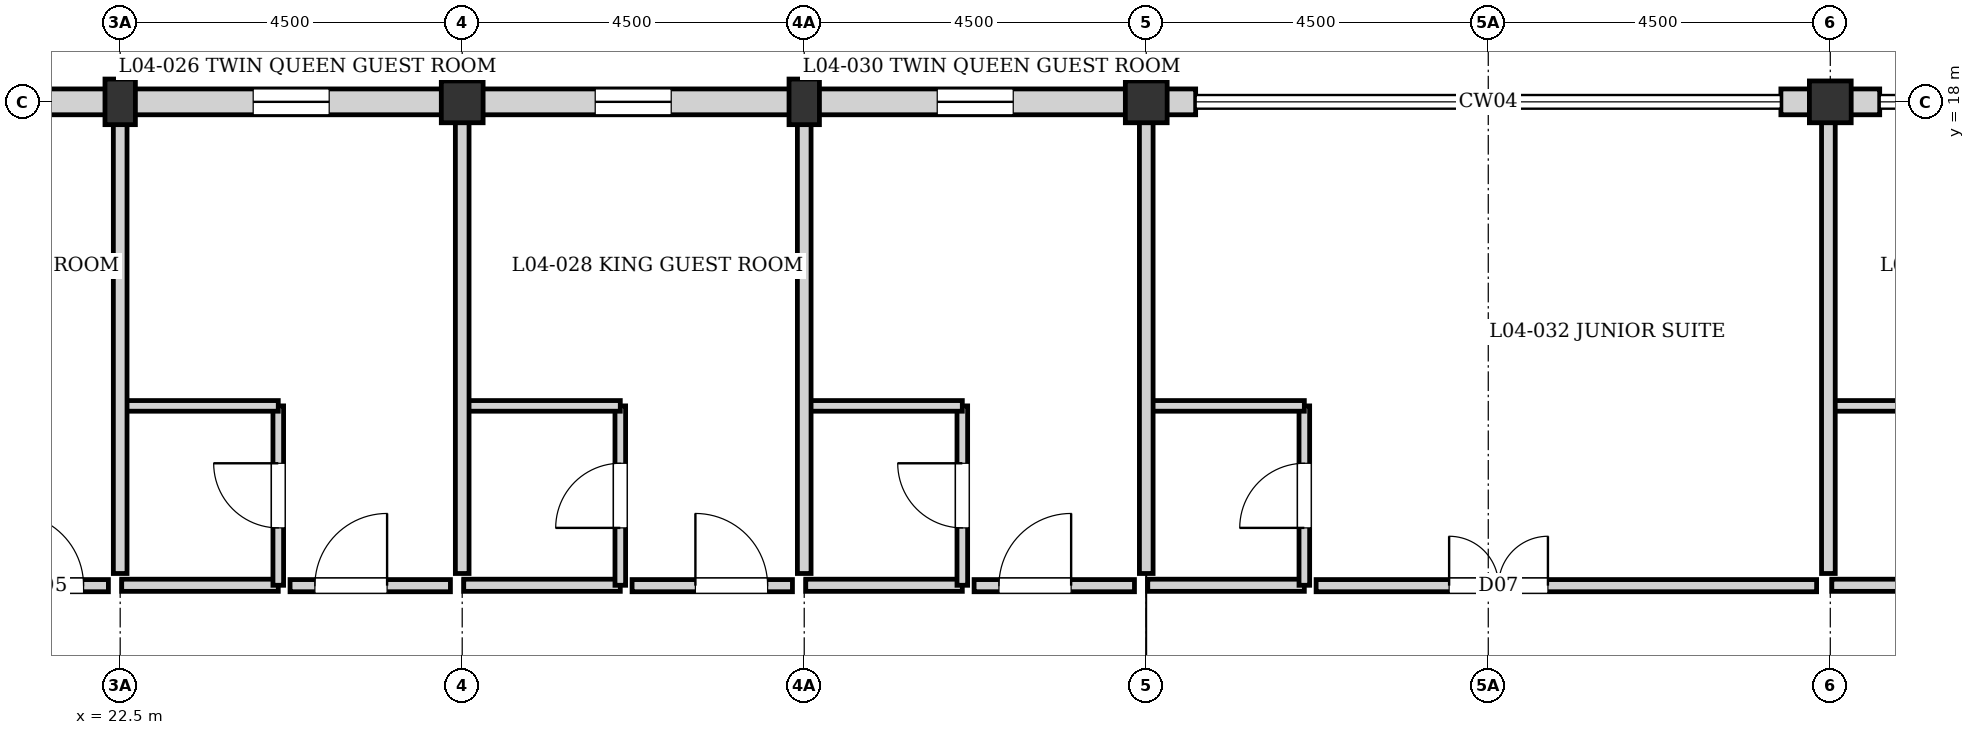
"""IFC4 building model, lengths in metres.
Left out: names, types, materials, properties, quantities, classifications, styles, units other than length and angle.
Written with IfcOpenShell. Run it as: python <this file> out.ifc"""

import sys

from ifc_helpers import new_model, si_unit, direction, frame, frame_2d, origin, origin_2d, place, context, subcontext, project, spatial, rectangle, extrude, element, fill, save


model = new_model("IFC4")
c1 = context("Model", 3, precision=1e-05, world=origin(), true_north=direction((0.0, 1.0)))
c2 = subcontext(c1, "Body", "Model", "MODEL_VIEW")
j1 = project(units=[si_unit("LENGTHUNIT", "METRE"), si_unit("PLANEANGLEUNIT", "RADIAN")], contexts=[c1])
p1 = place(None, origin())
s1 = spatial("IfcSite", under=j1, at=p1, CompositionType="ELEMENT")
p2 = place(p1, origin())
s2 = spatial("IfcBuilding", under=s1, at=p2, CompositionType="ELEMENT")
p3 = place(p2, frame((0.0, 0.0, 14.56)))
s3 = spatial("IfcBuildingStorey", under=s2, at=p3, CompositionType="ELEMENT", Elevation=14.56)
for number, where, z_axis, x_axis in (
    (1, (27.0, 18.0, 0.0), (0.0, 0.0, 1.0), (1.0, 0.0, 0.0)),
    (2, (36.0, 18.0, 0.0), (0.0, 0.0, 1.0), (1.0, 0.0, 0.0)),
    (3, (45.0, 18.0, 0.0), (0.0, 0.0, 1.0), (1.0, 0.0, 0.0)),
):
    element("IfcColumn", number, at=place(p3, frame(where, z_axis=z_axis, x_axis=x_axis)), inside=s3, PredefinedType="COLUMN", context=c2, shape_type="SweptSolid", body=[
        extrude(rectangle(XDim=0.55, YDim=0.55, at=origin_2d()), origin(), (0.0, 0.0, 1.0), 3.04),
    ])
for number, where, z_axis, x_axis in (
    (4, (22.5, 18.0, 0.0), (0.0, 0.0, 1.0), (1.0, 0.0, 0.0)),
    (5, (31.5, 18.0, 0.0), (0.0, 0.0, 1.0), (1.0, 0.0, 0.0)),
):
    element("IfcColumn", number, at=place(p3, frame(where, z_axis=z_axis, x_axis=x_axis)), inside=s3, PredefinedType="PILASTER", context=c2, shape_type="SweptSolid", body=[
        extrude(rectangle(XDim=0.4, YDim=0.6, at=origin_2d()), origin(), (0.0, 0.0, 1.0), 3.04),
    ])
p4 = place(p3, frame((18.0, 18.0, 0.0), z_axis=(0.0, 0.0, 1.0), x_axis=(1.0, 0.0, 0.0)))
e6 = element("IfcWall", 6, at=p4, inside=s3, PredefinedType="SOLIDWALL", context=c2, shape_type="SweptSolid", body=[
    extrude(rectangle(XDim=9.0, YDim=0.34, at=frame_2d((4.5, 0.0))), origin(), (0.0, 0.0, 1.0), 2.55),
])
p5 = place(p4, frame((1.75, 0.0, 0.35)))
e7 = element("IfcOpeningElement", 7, at=p5, cuts=e6, PredefinedType="OPENING", context=c2, shape_type="SweptSolid", body=[
    extrude(rectangle(XDim=1.0, YDim=1.6, at=frame_2d((0.5, 0.8))), frame((0.0, 0.18, 0.0), z_axis=(0.0, -1.0, 0.0), x_axis=(1.0, 0.0, 0.0)), (0.0, 0.0, 1.0), 0.36),
])
p6 = place(p4, frame((6.25, 0.0, 0.35)))
e8 = element("IfcOpeningElement", 8, at=p6, cuts=e6, PredefinedType="OPENING", context=c2, shape_type="SweptSolid", body=[
    extrude(rectangle(XDim=1.0, YDim=1.6, at=frame_2d((0.5, 0.8))), frame((0.0, 0.18, 0.0), z_axis=(0.0, -1.0, 0.0), x_axis=(1.0, 0.0, 0.0)), (0.0, 0.0, 1.0), 0.36),
])
p7 = place(p3, frame((27.0, 18.0, 0.0), z_axis=(0.0, 0.0, 1.0), x_axis=(1.0, 0.0, 0.0)))
e9 = element("IfcWall", 9, at=p7, inside=s3, PredefinedType="SOLIDWALL", context=c2, shape_type="SweptSolid", body=[
    extrude(rectangle(XDim=9.0, YDim=0.34, at=frame_2d((4.5, 0.0))), origin(), (0.0, 0.0, 1.0), 2.48),
])
p8 = place(p7, frame((1.75, 0.0, 0.35)))
e10 = element("IfcOpeningElement", 10, at=p8, cuts=e9, PredefinedType="OPENING", context=c2, shape_type="SweptSolid", body=[
    extrude(rectangle(XDim=1.0, YDim=1.6, at=frame_2d((0.5, 0.8))), frame((0.0, 0.18, 0.0), z_axis=(0.0, -1.0, 0.0), x_axis=(1.0, 0.0, 0.0)), (0.0, 0.0, 1.0), 0.36),
])
p9 = place(p7, frame((6.25, 0.0, 0.35)))
e11 = element("IfcOpeningElement", 11, at=p9, cuts=e9, PredefinedType="OPENING", context=c2, shape_type="SweptSolid", body=[
    extrude(rectangle(XDim=1.0, YDim=1.6, at=frame_2d((0.5, 0.8))), frame((0.0, 0.18, 0.0), z_axis=(0.0, -1.0, 0.0), x_axis=(1.0, 0.0, 0.0)), (0.0, 0.0, 1.0), 0.36),
])
for number, where, z_axis, x_axis in (
    (12, (36.0, 18.0, 0.0), (0.0, 0.0, 1.0), (1.0, 0.0, 0.0)),
    (13, (44.35, 18.0, 0.0), (0.0, 0.0, 1.0), (1.0, 0.0, 0.0)),
):
    element("IfcWall", number, at=place(p3, frame(where, z_axis=z_axis, x_axis=x_axis)), inside=s3, PredefinedType="SOLIDWALL", context=c2, shape_type="SweptSolid", body=[
        extrude(rectangle(XDim=0.65, YDim=0.34, at=frame_2d((0.325, 0.0))), origin(), (0.0, 0.0, 1.0), 2.42),
    ])
p10 = place(p3, frame((45.0, 18.0, 0.0), z_axis=(0.0, 0.0, 1.0), x_axis=(1.0, 0.0, 0.0)))
e14 = element("IfcWall", 14, at=p10, inside=s3, PredefinedType="SOLIDWALL", context=c2, shape_type="SweptSolid", body=[
    extrude(rectangle(XDim=0.65, YDim=0.34, at=frame_2d((0.325, 0.0))), origin(), (0.0, 0.0, 1.0), 2.38),
])
p11 = place(p3, frame((22.52, 11.64, 0.0), z_axis=(0.0, 0.0, 1.0), x_axis=(1.0, 0.0, 0.0)))
e15 = element("IfcWall", 15, at=p11, inside=s3, PredefinedType="PARTITIONING", context=c2, shape_type="SweptSolid", body=[
    extrude(rectangle(XDim=2.06, YDim=0.16, at=frame_2d((1.03, 0.0))), origin(), (0.0, 0.0, 1.0), 2.82),
])
p12 = place(p3, frame((24.58, 11.64, 0.0), z_axis=(0.0, 0.0, 1.0), x_axis=(0.0, 1.0, 0.0)))
e16 = element("IfcWall", 16, at=p12, inside=s3, PredefinedType="PLUMBINGWALL", context=c2, shape_type="SweptSolid", body=[
    extrude(rectangle(XDim=2.36, YDim=0.14, at=frame_2d((1.18, 0.0))), origin(), (0.0, 0.0, 1.0), 2.82),
])
p13 = place(p12, frame((0.755, 0.0, 0.0)))
e17 = element("IfcOpeningElement", 17, at=p13, cuts=e16, PredefinedType="OPENING", context=c2, shape_type="SweptSolid", body=[
    extrude(rectangle(XDim=0.85, YDim=2.04, at=frame_2d((0.425, 1.02))), frame((0.0, 0.08, 0.0), z_axis=(0.0, -1.0, 0.0), x_axis=(1.0, 0.0, 0.0)), (0.0, 0.0, 1.0), 0.16),
])
p14 = place(p3, frame((22.52, 14.0, 0.0), z_axis=(0.0, 0.0, 1.0), x_axis=(1.0, 0.0, 0.0)))
e18 = element("IfcWall", 18, at=p14, inside=s3, PredefinedType="PLUMBINGWALL", context=c2, shape_type="SweptSolid", body=[
    extrude(rectangle(XDim=2.06, YDim=0.14, at=frame_2d((1.03, 0.0))), origin(), (0.0, 0.0, 1.0), 2.82),
])
p15 = place(p3, frame((27.02, 11.64, 0.0), z_axis=(0.0, 0.0, 1.0), x_axis=(1.0, 0.0, 0.0)))
e19 = element("IfcWall", 19, at=p15, inside=s3, PredefinedType="PARTITIONING", context=c2, shape_type="SweptSolid", body=[
    extrude(rectangle(XDim=2.06, YDim=0.16, at=frame_2d((1.03, 0.0))), origin(), (0.0, 0.0, 1.0), 2.82),
])
p16 = place(p3, frame((29.08, 11.64, 0.0), z_axis=(0.0, 0.0, 1.0), x_axis=(0.0, 1.0, 0.0)))
e20 = element("IfcWall", 20, at=p16, inside=s3, PredefinedType="PLUMBINGWALL", context=c2, shape_type="SweptSolid", body=[
    extrude(rectangle(XDim=2.36, YDim=0.14, at=frame_2d((1.18, 0.0))), origin(), (0.0, 0.0, 1.0), 2.82),
])
p17 = place(p16, frame((0.755, 0.0, 0.0)))
e21 = element("IfcOpeningElement", 21, at=p17, cuts=e20, PredefinedType="OPENING", context=c2, shape_type="SweptSolid", body=[
    extrude(rectangle(XDim=0.85, YDim=2.04, at=frame_2d((0.425, 1.02))), frame((0.0, 0.08, 0.0), z_axis=(0.0, -1.0, 0.0), x_axis=(1.0, 0.0, 0.0)), (0.0, 0.0, 1.0), 0.16),
])
p18 = place(p3, frame((27.02, 14.0, 0.0), z_axis=(0.0, 0.0, 1.0), x_axis=(1.0, 0.0, 0.0)))
e22 = element("IfcWall", 22, at=p18, inside=s3, PredefinedType="PLUMBINGWALL", context=c2, shape_type="SweptSolid", body=[
    extrude(rectangle(XDim=2.06, YDim=0.14, at=frame_2d((1.03, 0.0))), origin(), (0.0, 0.0, 1.0), 2.82),
])
p19 = place(p3, frame((31.52, 11.64, 0.0), z_axis=(0.0, 0.0, 1.0), x_axis=(1.0, 0.0, 0.0)))
e23 = element("IfcWall", 23, at=p19, inside=s3, PredefinedType="PARTITIONING", context=c2, shape_type="SweptSolid", body=[
    extrude(rectangle(XDim=2.06, YDim=0.16, at=frame_2d((1.03, 0.0))), origin(), (0.0, 0.0, 1.0), 2.82),
])
p20 = place(p3, frame((33.58, 11.64, 0.0), z_axis=(0.0, 0.0, 1.0), x_axis=(0.0, 1.0, 0.0)))
e24 = element("IfcWall", 24, at=p20, inside=s3, PredefinedType="PLUMBINGWALL", context=c2, shape_type="SweptSolid", body=[
    extrude(rectangle(XDim=2.36, YDim=0.14, at=frame_2d((1.18, 0.0))), origin(), (0.0, 0.0, 1.0), 2.82),
])
p21 = place(p20, frame((0.755, 0.0, 0.0)))
e25 = element("IfcOpeningElement", 25, at=p21, cuts=e24, PredefinedType="OPENING", context=c2, shape_type="SweptSolid", body=[
    extrude(rectangle(XDim=0.85, YDim=2.04, at=frame_2d((0.425, 1.02))), frame((0.0, 0.08, 0.0), z_axis=(0.0, -1.0, 0.0), x_axis=(1.0, 0.0, 0.0)), (0.0, 0.0, 1.0), 0.16),
])
p22 = place(p3, frame((31.52, 14.0, 0.0), z_axis=(0.0, 0.0, 1.0), x_axis=(1.0, 0.0, 0.0)))
e26 = element("IfcWall", 26, at=p22, inside=s3, PredefinedType="PLUMBINGWALL", context=c2, shape_type="SweptSolid", body=[
    extrude(rectangle(XDim=2.06, YDim=0.14, at=frame_2d((1.03, 0.0))), origin(), (0.0, 0.0, 1.0), 2.82),
])
p23 = place(p3, frame((36.02, 11.64, 0.0), z_axis=(0.0, 0.0, 1.0), x_axis=(1.0, 0.0, 0.0)))
e27 = element("IfcWall", 27, at=p23, inside=s3, PredefinedType="PARTITIONING", context=c2, shape_type="SweptSolid", body=[
    extrude(rectangle(XDim=2.06, YDim=0.16, at=frame_2d((1.03, 0.0))), origin(), (0.0, 0.0, 1.0), 2.82),
])
p24 = place(p3, frame((38.08, 11.64, 0.0), z_axis=(0.0, 0.0, 1.0), x_axis=(0.0, 1.0, 0.0)))
e28 = element("IfcWall", 28, at=p24, inside=s3, PredefinedType="PLUMBINGWALL", context=c2, shape_type="SweptSolid", body=[
    extrude(rectangle(XDim=2.36, YDim=0.14, at=frame_2d((1.18, 0.0))), origin(), (0.0, 0.0, 1.0), 2.82),
])
p25 = place(p24, frame((0.755, 0.0, 0.0)))
e29 = element("IfcOpeningElement", 29, at=p25, cuts=e28, PredefinedType="OPENING", context=c2, shape_type="SweptSolid", body=[
    extrude(rectangle(XDim=0.85, YDim=2.04, at=frame_2d((0.425, 1.02))), frame((0.0, 0.08, 0.0), z_axis=(0.0, -1.0, 0.0), x_axis=(1.0, 0.0, 0.0)), (0.0, 0.0, 1.0), 0.16),
])
p26 = place(p3, frame((36.02, 14.0, 0.0), z_axis=(0.0, 0.0, 1.0), x_axis=(1.0, 0.0, 0.0)))
e30 = element("IfcWall", 30, at=p26, inside=s3, PredefinedType="PLUMBINGWALL", context=c2, shape_type="SweptSolid", body=[
    extrude(rectangle(XDim=2.06, YDim=0.14, at=frame_2d((1.03, 0.0))), origin(), (0.0, 0.0, 1.0), 2.82),
])
p27 = place(p3, frame((45.02, 11.64, 0.0), z_axis=(0.0, 0.0, 1.0), x_axis=(1.0, 0.0, 0.0)))
e31 = element("IfcWall", 31, at=p27, inside=s3, PredefinedType="PARTITIONING", context=c2, shape_type="SweptSolid", body=[
    extrude(rectangle(XDim=2.06, YDim=0.16, at=frame_2d((1.03, 0.0))), origin(), (0.0, 0.0, 1.0), 2.82),
])
p28 = place(p3, frame((45.02, 14.0, 0.0), z_axis=(0.0, 0.0, 1.0), x_axis=(1.0, 0.0, 0.0)))
e32 = element("IfcWall", 32, at=p28, inside=s3, PredefinedType="PLUMBINGWALL", context=c2, shape_type="SweptSolid", body=[
    extrude(rectangle(XDim=2.06, YDim=0.14, at=frame_2d((1.03, 0.0))), origin(), (0.0, 0.0, 1.0), 2.82),
])
p29 = place(p3, frame((22.5, 11.795, 0.0), z_axis=(0.0, 0.0, 1.0), x_axis=(0.0, 1.0, 0.0)))
e33 = element("IfcWall", 33, at=p29, inside=s3, PredefinedType="PARTITIONING", context=c2, shape_type="SweptSolid", body=[
    extrude(rectangle(XDim=6.03, YDim=0.18, at=frame_2d((3.015, 0.0))), origin(), (0.0, 0.0, 1.0), 2.82),
])
p30 = place(p3, frame((27.0, 11.795, 0.0), z_axis=(0.0, 0.0, 1.0), x_axis=(0.0, 1.0, 0.0)))
e34 = element("IfcWall", 34, at=p30, inside=s3, PredefinedType="PARTITIONING", context=c2, shape_type="SweptSolid", body=[
    extrude(rectangle(XDim=6.03, YDim=0.18, at=frame_2d((3.015, 0.0))), origin(), (0.0, 0.0, 1.0), 2.34),
])
p31 = place(p3, frame((31.5, 11.795, 0.0), z_axis=(0.0, 0.0, 1.0), x_axis=(0.0, 1.0, 0.0)))
e35 = element("IfcWall", 35, at=p31, inside=s3, PredefinedType="PARTITIONING", context=c2, shape_type="SweptSolid", body=[
    extrude(rectangle(XDim=6.03, YDim=0.18, at=frame_2d((3.015, 0.0))), origin(), (0.0, 0.0, 1.0), 2.82),
])
p32 = place(p3, frame((36.0, 11.795, 0.0), z_axis=(0.0, 0.0, 1.0), x_axis=(0.0, 1.0, 0.0)))
e36 = element("IfcWall", 36, at=p32, inside=s3, PredefinedType="PARTITIONING", context=c2, shape_type="SweptSolid", body=[
    extrude(rectangle(XDim=6.03, YDim=0.18, at=frame_2d((3.015, 0.0))), origin(), (0.0, 0.0, 1.0), 2.29),
])
p33 = place(p3, frame((44.975, 11.795, 0.0), z_axis=(0.0, 0.0, 1.0), x_axis=(0.0, 1.0, 0.0)))
e37 = element("IfcWall", 37, at=p33, inside=s3, PredefinedType="PARTITIONING", context=c2, shape_type="SweptSolid", body=[
    extrude(rectangle(XDim=6.03, YDim=0.18, at=frame_2d((3.015, 0.0))), origin(), (0.0, 0.0, 1.0), 2.19),
])
p34 = place(p3, frame((20.235, 11.635, 0.0), z_axis=(0.0, 0.0, 1.0), x_axis=(1.0, 0.0, 0.0)))
e38 = element("IfcWall", 38, at=p34, inside=s3, PredefinedType="PARTITIONING", context=c2, shape_type="SweptSolid", body=[
    extrude(rectangle(XDim=2.11, YDim=0.16, at=frame_2d((1.055, 0.0))), origin(), (0.0, 0.0, 1.0), 2.82),
])
p35 = place(p34, frame((0.833, 0.0, 0.0)))
e39 = element("IfcOpeningElement", 39, at=p35, cuts=e38, PredefinedType="OPENING", context=c2, shape_type="SweptSolid", body=[
    extrude(rectangle(XDim=0.95, YDim=2.15, at=frame_2d((0.475, 1.075))), frame((0.0, 0.09, 0.0), z_axis=(0.0, -1.0, 0.0), x_axis=(1.0, 0.0, 0.0)), (0.0, 0.0, 1.0), 0.18),
])
p36 = place(p3, frame((24.735, 11.635, 0.0), z_axis=(0.0, 0.0, 1.0), x_axis=(1.0, 0.0, 0.0)))
e40 = element("IfcWall", 40, at=p36, inside=s3, PredefinedType="PARTITIONING", context=c2, shape_type="SweptSolid", body=[
    extrude(rectangle(XDim=2.11, YDim=0.16, at=frame_2d((1.055, 0.0))), origin(), (0.0, 0.0, 1.0), 2.82),
])
p37 = place(p36, frame((0.327, 0.0, 0.0)))
e41 = element("IfcOpeningElement", 41, at=p37, cuts=e40, PredefinedType="OPENING", context=c2, shape_type="SweptSolid", body=[
    extrude(rectangle(XDim=0.95, YDim=2.15, at=frame_2d((0.475, 1.075))), frame((0.0, 0.09, 0.0), z_axis=(0.0, -1.0, 0.0), x_axis=(1.0, 0.0, 0.0)), (0.0, 0.0, 1.0), 0.18),
])
p38 = place(p3, frame((29.235, 11.635, 0.0), z_axis=(0.0, 0.0, 1.0), x_axis=(1.0, 0.0, 0.0)))
e42 = element("IfcWall", 42, at=p38, inside=s3, PredefinedType="PARTITIONING", context=c2, shape_type="SweptSolid", body=[
    extrude(rectangle(XDim=2.11, YDim=0.16, at=frame_2d((1.055, 0.0))), origin(), (0.0, 0.0, 1.0), 2.82),
])
p39 = place(p38, frame((0.833, 0.0, 0.0)))
e43 = element("IfcOpeningElement", 43, at=p39, cuts=e42, PredefinedType="OPENING", context=c2, shape_type="SweptSolid", body=[
    extrude(rectangle(XDim=0.95, YDim=2.15, at=frame_2d((0.475, 1.075))), frame((0.0, 0.09, 0.0), z_axis=(0.0, -1.0, 0.0), x_axis=(1.0, 0.0, 0.0)), (0.0, 0.0, 1.0), 0.18),
])
p40 = place(p3, frame((33.735, 11.635, 0.0), z_axis=(0.0, 0.0, 1.0), x_axis=(1.0, 0.0, 0.0)))
e44 = element("IfcWall", 44, at=p40, inside=s3, PredefinedType="PARTITIONING", context=c2, shape_type="SweptSolid", body=[
    extrude(rectangle(XDim=2.11, YDim=0.16, at=frame_2d((1.055, 0.0))), origin(), (0.0, 0.0, 1.0), 2.82),
])
p41 = place(p40, frame((0.327, 0.0, 0.0)))
e45 = element("IfcOpeningElement", 45, at=p41, cuts=e44, PredefinedType="OPENING", context=c2, shape_type="SweptSolid", body=[
    extrude(rectangle(XDim=0.95, YDim=2.15, at=frame_2d((0.475, 1.075))), frame((0.0, 0.09, 0.0), z_axis=(0.0, -1.0, 0.0), x_axis=(1.0, 0.0, 0.0)), (0.0, 0.0, 1.0), 0.18),
])
p42 = place(p3, frame((38.235, 11.635, 0.0), z_axis=(0.0, 0.0, 1.0), x_axis=(1.0, 0.0, 0.0)))
e46 = element("IfcWall", 46, at=p42, inside=s3, PredefinedType="PARTITIONING", context=c2, shape_type="SweptSolid", body=[
    extrude(rectangle(XDim=6.585, YDim=0.16, at=frame_2d((3.292, 0.0))), origin(), (0.0, 0.0, 1.0), 2.82),
])
p43 = place(p42, frame((1.75, 0.0, 0.0)))
e47 = element("IfcOpeningElement", 47, at=p43, cuts=e46, PredefinedType="OPENING", context=c2, shape_type="SweptSolid", body=[
    extrude(rectangle(XDim=1.3, YDim=2.25, at=frame_2d((0.65, 1.125))), frame((0.0, 0.09, 0.0), z_axis=(0.0, -1.0, 0.0), x_axis=(1.0, 0.0, 0.0)), (0.0, 0.0, 1.0), 0.18),
])
p44 = place(p6, origin())
e48 = element("IfcWindow", 48, at=p44, inside=s3, PartitioningType="SINGLE_PANEL", PredefinedType="WINDOW", context=c2, shape_type="SweptSolid", body=[
    extrude(rectangle(XDim=1.0, YDim=1.6, at=frame_2d((0.5, 0.8))), frame((0.0, 0.03, 0.0), z_axis=(0.0, -1.0, 0.0), x_axis=(1.0, 0.0, 0.0)), (0.0, 0.0, 1.0), 0.06),
])
fill(e8, e48)
p45 = place(p8, origin())
e49 = element("IfcWindow", 49, at=p45, inside=s3, PartitioningType="SINGLE_PANEL", PredefinedType="WINDOW", context=c2, shape_type="SweptSolid", body=[
    extrude(rectangle(XDim=1.0, YDim=1.6, at=frame_2d((0.5, 0.8))), frame((0.0, 0.03, 0.0), z_axis=(0.0, -1.0, 0.0), x_axis=(1.0, 0.0, 0.0)), (0.0, 0.0, 1.0), 0.06),
])
fill(e10, e49)
p46 = place(p9, origin())
e50 = element("IfcWindow", 50, at=p46, inside=s3, PartitioningType="SINGLE_PANEL", PredefinedType="WINDOW", context=c2, shape_type="SweptSolid", body=[
    extrude(rectangle(XDim=1.0, YDim=1.6, at=frame_2d((0.5, 0.8))), frame((0.0, 0.03, 0.0), z_axis=(0.0, -1.0, 0.0), x_axis=(1.0, 0.0, 0.0)), (0.0, 0.0, 1.0), 0.06),
])
fill(e11, e50)
p47 = place(p13, origin())
e51 = element("IfcDoor", 51, at=p47, inside=s3, OperationType="SINGLE_SWING_RIGHT", PredefinedType="DOOR", context=c2, shape_type="SweptSolid", body=[
    extrude(rectangle(XDim=0.85, YDim=2.04, at=frame_2d((0.425, 1.02))), frame((0.0, 0.025, 0.0), z_axis=(0.0, -1.0, 0.0), x_axis=(1.0, 0.0, 0.0)), (0.0, 0.0, 1.0), 0.05),
])
fill(e17, e51)
p48 = place(p17, origin())
e52 = element("IfcDoor", 52, at=p48, inside=s3, OperationType="SINGLE_SWING_LEFT", PredefinedType="DOOR", context=c2, shape_type="SweptSolid", body=[
    extrude(rectangle(XDim=0.85, YDim=2.04, at=frame_2d((0.425, 1.02))), frame((0.0, 0.025, 0.0), z_axis=(0.0, -1.0, 0.0), x_axis=(1.0, 0.0, 0.0)), (0.0, 0.0, 1.0), 0.05),
])
fill(e21, e52)
p49 = place(p21, origin())
e53 = element("IfcDoor", 53, at=p49, inside=s3, OperationType="SINGLE_SWING_RIGHT", PredefinedType="DOOR", context=c2, shape_type="SweptSolid", body=[
    extrude(rectangle(XDim=0.85, YDim=2.04, at=frame_2d((0.425, 1.02))), frame((0.0, 0.025, 0.0), z_axis=(0.0, -1.0, 0.0), x_axis=(1.0, 0.0, 0.0)), (0.0, 0.0, 1.0), 0.05),
])
fill(e25, e53)
p50 = place(p25, origin())
e54 = element("IfcDoor", 54, at=p50, inside=s3, OperationType="SINGLE_SWING_LEFT", PredefinedType="DOOR", context=c2, shape_type="SweptSolid", body=[
    extrude(rectangle(XDim=0.85, YDim=2.04, at=frame_2d((0.425, 1.02))), frame((0.0, 0.025, 0.0), z_axis=(0.0, -1.0, 0.0), x_axis=(1.0, 0.0, 0.0)), (0.0, 0.0, 1.0), 0.05),
])
fill(e29, e54)
p51 = place(p35, origin())
e55 = element("IfcDoor", 55, at=p51, inside=s3, OperationType="SINGLE_SWING_LEFT", PredefinedType="DOOR", context=c2, shape_type="SweptSolid", body=[
    extrude(rectangle(XDim=0.95, YDim=2.15, at=frame_2d((0.475, 1.075))), frame((0.0, 0.025, 0.0), z_axis=(0.0, -1.0, 0.0), x_axis=(1.0, 0.0, 0.0)), (0.0, 0.0, 1.0), 0.05),
])
fill(e39, e55)
p52 = place(p37, origin())
e56 = element("IfcDoor", 56, at=p52, inside=s3, OperationType="SINGLE_SWING_RIGHT", PredefinedType="DOOR", context=c2, shape_type="SweptSolid", body=[
    extrude(rectangle(XDim=0.95, YDim=2.15, at=frame_2d((0.475, 1.075))), frame((0.0, 0.025, 0.0), z_axis=(0.0, -1.0, 0.0), x_axis=(1.0, 0.0, 0.0)), (0.0, 0.0, 1.0), 0.05),
])
fill(e41, e56)
p53 = place(p39, origin())
e57 = element("IfcDoor", 57, at=p53, inside=s3, OperationType="SINGLE_SWING_LEFT", PredefinedType="DOOR", context=c2, shape_type="SweptSolid", body=[
    extrude(rectangle(XDim=0.95, YDim=2.15, at=frame_2d((0.475, 1.075))), frame((0.0, 0.025, 0.0), z_axis=(0.0, -1.0, 0.0), x_axis=(1.0, 0.0, 0.0)), (0.0, 0.0, 1.0), 0.05),
])
fill(e43, e57)
p54 = place(p41, origin())
e58 = element("IfcDoor", 58, at=p54, inside=s3, OperationType="SINGLE_SWING_RIGHT", PredefinedType="DOOR", context=c2, shape_type="SweptSolid", body=[
    extrude(rectangle(XDim=0.95, YDim=2.15, at=frame_2d((0.475, 1.075))), frame((0.0, 0.025, 0.0), z_axis=(0.0, -1.0, 0.0), x_axis=(1.0, 0.0, 0.0)), (0.0, 0.0, 1.0), 0.05),
])
fill(e45, e58)
p55 = place(p43, origin())
e59 = element("IfcDoor", 59, at=p55, inside=s3, OperationType="DOUBLE_DOOR_SINGLE_SWING", PredefinedType="DOOR", context=c2, shape_type="SweptSolid", body=[
    extrude(rectangle(XDim=1.3, YDim=2.25, at=frame_2d((0.65, 1.125))), frame((0.0, 0.025, 0.0), z_axis=(0.0, -1.0, 0.0), x_axis=(1.0, 0.0, 0.0)), (0.0, 0.0, 1.0), 0.05),
])
fill(e47, e59)
save(model, sys.argv[1])
